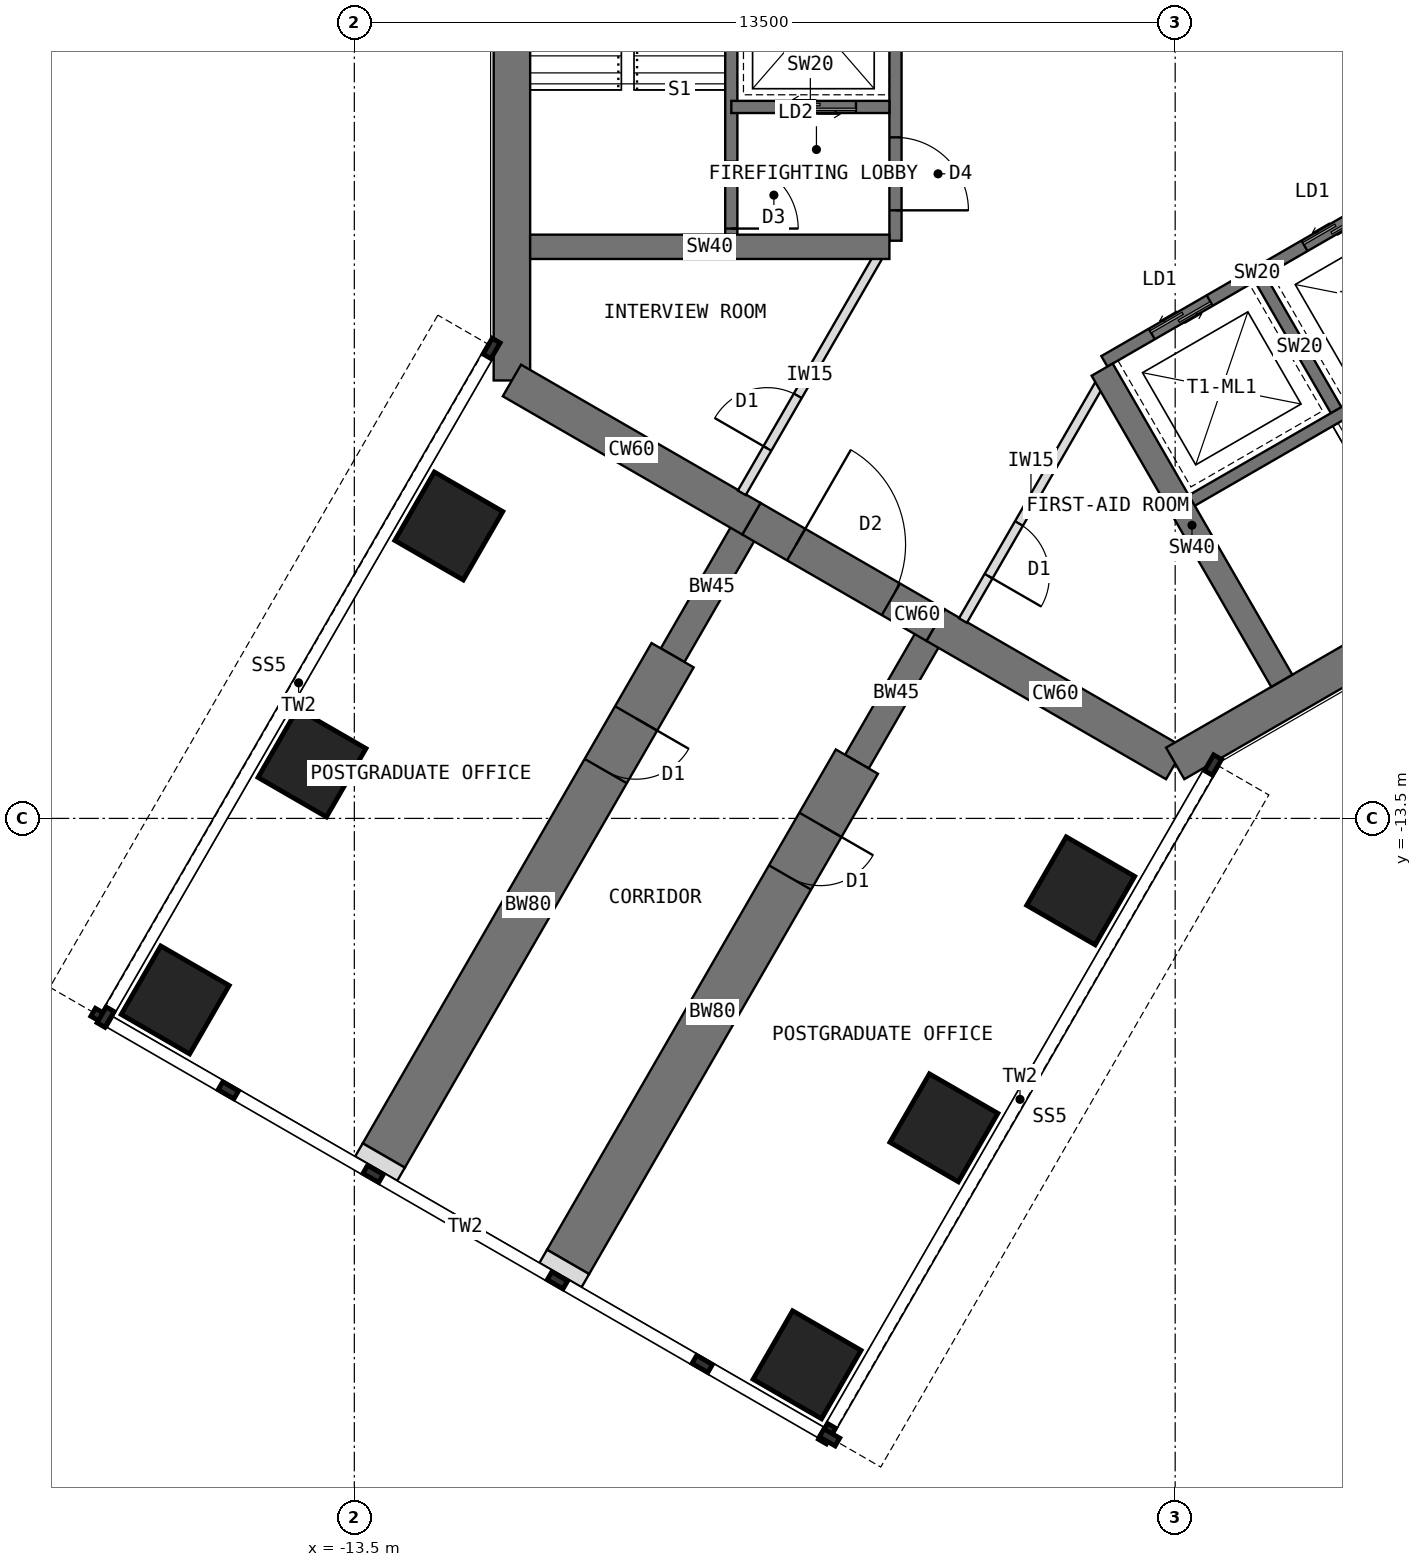
"""IFC4 building model, lengths in metres.
Left out: names, types, materials, properties, quantities, classifications, styles, units other than length and angle.
Written with IfcOpenShell. Run it as: python <this file> out.ifc"""

import sys

from ifc_helpers import new_model, si_unit, direction, frame, frame_2d, origin, origin_2d, place, context, subcontext, project, spatial, rectangle, extrude, element, fill, save


model = new_model("IFC4")
c1 = context("Model", 3, precision=1e-05, world=origin(), true_north=direction((0.0, 1.0)))
c2 = subcontext(c1, "Body", "Model", "MODEL_VIEW")
j1 = project(units=[si_unit("LENGTHUNIT", "METRE"), si_unit("PLANEANGLEUNIT", "RADIAN")], contexts=[c1])
p1 = place(None, origin())
s1 = spatial("IfcSite", under=j1, at=p1, CompositionType="ELEMENT")
p2 = place(p1, origin())
s2 = spatial("IfcBuilding", under=s1, at=p2, CompositionType="ELEMENT")
p3 = place(p2, frame((0.0, 0.0, 133.5)))
s3 = spatial("IfcBuildingStorey", under=s2, at=p3, CompositionType="ELEMENT", Elevation=133.5)
p4 = place(p3, frame((-10.908, 6.298, 0.0), z_axis=(0.0, 0.0, 1.0), x_axis=(0.0, -1.0, 0.0)))
e1 = element("IfcWall", 1, at=p4, inside=s3, PredefinedType="SHEAR", context=c2, shape_type="SweptSolid", body=[
    extrude(rectangle(XDim=12.596, YDim=0.6, at=frame_2d((6.298, 0.0))), origin(), (0.0, 0.0, 1.0), 4.0),
])
p5 = place(p3, frame((-10.908, -6.298, 0.0), z_axis=(0.0, 0.0, 1.0), x_axis=(0.866034513004, -0.499984222037, 0.0)))
e2 = element("IfcWall", 2, at=p5, inside=s3, PredefinedType="SHEAR", context=c2, shape_type="SweptSolid", body=[
    extrude(rectangle(XDim=4.548, YDim=0.6, at=frame_2d((2.274, 0.0))), origin(), (0.0, 0.0, 1.0), 4.0),
])
p6 = place(p3, frame((-6.97, -8.572, 0.0), z_axis=(0.0, 0.0, 1.0), x_axis=(0.866019471182, -0.500010275428, 0.0)))
e3 = element("IfcWall", 3, at=p6, inside=s3, PredefinedType="SHEAR", context=c2, shape_type="SweptSolid", body=[
    extrude(rectangle(XDim=3.5, YDim=0.6, at=frame_2d((1.75, 0.0))), origin(), (0.0, 0.0, 1.0), 4.0),
])
p7 = place(p6, frame((0.85, 0.0, 0.0)))
e4 = element("IfcOpeningElement", 4, at=p7, cuts=e3, PredefinedType="OPENING", context=c2, shape_type="SweptSolid", body=[
    extrude(rectangle(XDim=1.8, YDim=2.1, at=frame_2d((0.9, 1.05))), frame((0.0, 0.31, 0.0), z_axis=(0.0, -1.0, 0.0), x_axis=(1.0, 0.0, 0.0)), (0.0, 0.0, 1.0), 0.62),
])
p8 = place(p3, frame((-3.939, -10.322, 0.0), z_axis=(0.0, 0.0, 1.0), x_axis=(0.866011268655, -0.500024481964, 0.0)))
e5 = element("IfcWall", 5, at=p8, inside=s3, PredefinedType="SHEAR", context=c2, shape_type="SweptSolid", body=[
    extrude(rectangle(XDim=4.548, YDim=0.6, at=frame_2d((2.274, 0.0))), origin(), (0.0, 0.0, 1.0), 4.0),
])
p9 = place(p3, frame((0.0, -12.596, 0.0), z_axis=(0.0, 0.0, 1.0), x_axis=(0.866021940709, 0.500005998175, 0.0)))
e6 = element("IfcWall", 6, at=p9, inside=s3, PredefinedType="SHEAR", context=c2, shape_type="SweptSolid", body=[
    extrude(rectangle(XDim=12.596, YDim=0.6, at=frame_2d((6.298, 0.0))), origin(), (0.0, 0.0, 1.0), 4.0),
])
p10 = place(p3, frame((-3.939, -10.322, 0.0), z_axis=(0.0, 0.0, 1.0), x_axis=(-0.499918158782, -0.866072649678, 0.0)))
e7 = element("IfcWall", 7, at=p10, inside=s3, PredefinedType="SHEAR", context=c2, shape_type="SweptSolid", body=[
    extrude(rectangle(XDim=2.592, YDim=0.45, at=frame_2d((1.296, 0.0))), origin(), (0.0, 0.0, 1.0), 4.0),
])
p11 = place(p3, frame((-5.234, -12.566, 0.0), z_axis=(0.0, 0.0, 1.0), x_axis=(-0.499997557548, -0.86602681393, 0.0)))
e8 = element("IfcWall", 8, at=p11, inside=s3, PredefinedType="SHEAR", context=c2, shape_type="SweptSolid", body=[
    extrude(rectangle(XDim=9.5, YDim=0.8, at=frame_2d((4.75, 0.0))), origin(), (0.0, 0.0, 1.0), 4.0),
])
p12 = place(p11, frame((1.2, 0.0, 0.0)))
e9 = element("IfcOpeningElement", 9, at=p12, cuts=e8, PredefinedType="OPENING", context=c2, shape_type="SweptSolid", body=[
    extrude(rectangle(XDim=1.0, YDim=2.1, at=frame_2d((0.5, 1.05))), frame((0.0, 0.41, 0.0), z_axis=(0.0, -1.0, 0.0), x_axis=(1.0, 0.0, 0.0)), (0.0, 0.0, 1.0), 0.82),
])
p13 = place(p3, frame((-6.97, -8.572, 0.0), z_axis=(0.0, 0.0, 1.0), x_axis=(-0.499988811324, -0.866031863473, 0.0)))
e10 = element("IfcWall", 10, at=p13, inside=s3, PredefinedType="SHEAR", context=c2, shape_type="SweptSolid", body=[
    extrude(rectangle(XDim=2.592, YDim=0.45, at=frame_2d((1.296, 0.0))), origin(), (0.0, 0.0, 1.0), 4.0),
])
p14 = place(p3, frame((-8.266, -10.816, 0.0), z_axis=(0.0, 0.0, 1.0), x_axis=(-0.499997557548, -0.86602681393, 0.0)))
e11 = element("IfcWall", 11, at=p14, inside=s3, PredefinedType="SHEAR", context=c2, shape_type="SweptSolid", body=[
    extrude(rectangle(XDim=9.5, YDim=0.8, at=frame_2d((4.75, 0.0))), origin(), (0.0, 0.0, 1.0), 4.0),
])
p15 = place(p14, frame((1.2, 0.0, 0.0)))
e12 = element("IfcOpeningElement", 12, at=p15, cuts=e11, PredefinedType="OPENING", context=c2, shape_type="SweptSolid", body=[
    extrude(rectangle(XDim=1.0, YDim=2.1, at=frame_2d((0.5, 1.05))), frame((0.0, 0.41, 0.0), z_axis=(0.0, -1.0, 0.0), x_axis=(1.0, 0.0, 0.0)), (0.0, 0.0, 1.0), 0.82),
])
for number, where, z_axis, x_axis in (
    (13, (-1.554, -14.691, 0.0), (0.0, 0.0, 1.0), (0.5, 0.866, 0.0)),
    (14, (-11.946, -8.691, 0.0), (0.0, 0.0, 1.0), (0.5, 0.866, 0.0)),
    (15, (-3.804, -18.588, 0.0), (0.0, 0.0, 1.0), (0.5, 0.866, 0.0)),
    (16, (-14.196, -12.588, 0.0), (0.0, 0.0, 1.0), (0.5, 0.866, 0.0)),
    (17, (-6.054, -22.486, 0.0), (0.0, 0.0, 1.0), (0.5, 0.866, 0.0)),
    (18, (-16.446, -16.486, 0.0), (0.0, 0.0, 1.0), (0.5, 0.866, 0.0)),
):
    element("IfcColumn", number, at=place(p3, frame(where, z_axis=z_axis, x_axis=x_axis)), inside=s3, PredefinedType="COLUMN", context=c2, shape_type="SweptSolid", body=[
        extrude(rectangle(XDim=1.3, YDim=1.3, at=origin_2d()), origin(), (0.0, 0.0, 1.0), 4.0),
    ])
for number, where, z_axis, x_axis in (
    (19, (-9.984, -20.794, 0.0), (0.0, 0.0, 1.0), (-0.5, -0.866, 0.0)),
    (20, (-13.016, -19.044, 0.0), (0.0, 0.0, 1.0), (-0.5, -0.866, 0.0)),
):
    element("IfcWall", number, at=place(p3, frame(where, z_axis=z_axis, x_axis=x_axis)), inside=s3, PredefinedType="PARTITIONING", context=c2, shape_type="SweptSolid", body=[
        extrude(rectangle(XDim=0.25, YDim=0.8, at=frame_2d((0.125, 0.0))), origin(), (0.0, 0.0, 1.0), 3.8),
    ])
p16 = place(p3, frame((-4.6, 4.0, 0.0), z_axis=(0.0, 0.0, 1.0), x_axis=(0.0, -1.0, 0.0)))
e21 = element("IfcWall", 21, at=p16, inside=s3, PredefinedType="SHEAR", context=c2, shape_type="SweptSolid", body=[
    extrude(rectangle(XDim=8.0, YDim=0.2, at=frame_2d((4.0, 0.0))), origin(), (0.0, 0.0, 1.0), 4.0),
])
p17 = place(p16, frame((6.3, 0.0, 0.0)))
e22 = element("IfcOpeningElement", 22, at=p17, cuts=e21, PredefinedType="OPENING", context=c2, shape_type="SweptSolid", body=[
    extrude(rectangle(XDim=1.2, YDim=2.1, at=frame_2d((0.6, 1.05))), frame((0.0, 0.11, 0.0), z_axis=(0.0, -1.0, 0.0), x_axis=(1.0, 0.0, 0.0)), (0.0, 0.0, 1.0), 0.22),
])
p18 = place(p16, frame((0.9, 0.0, 0.0)))
e23 = element("IfcOpeningElement", 23, at=p18, cuts=e21, PredefinedType="OPENING", context=c2, shape_type="SweptSolid", body=[
    extrude(rectangle(XDim=1.1, YDim=2.2, at=frame_2d((0.55, 1.1))), frame((0.0, 0.11, 0.0), z_axis=(0.0, -1.0, 0.0), x_axis=(1.0, 0.0, 0.0)), (0.0, 0.0, 1.0), 0.22),
])
p19 = place(p3, frame((-4.7, -1.8, 0.0), z_axis=(0.0, 0.0, 1.0), x_axis=(-1.0, 0.0, 0.0)))
e24 = element("IfcWall", 24, at=p19, inside=s3, PredefinedType="SHEAR", context=c2, shape_type="SweptSolid", body=[
    extrude(rectangle(XDim=2.6, YDim=0.2, at=frame_2d((1.3, 0.0))), origin(), (0.0, 0.0, 1.0), 4.0),
])
p20 = place(p19, frame((0.55, 0.0, 0.0)))
e25 = element("IfcOpeningElement", 25, at=p20, cuts=e24, PredefinedType="OPENING", context=c2, shape_type="SweptSolid", body=[
    extrude(rectangle(XDim=1.3, YDim=2.2, at=frame_2d((0.65, 1.1))), frame((0.0, 0.11, 0.0), z_axis=(0.0, -1.0, 0.0), x_axis=(1.0, 0.0, 0.0)), (0.0, 0.0, 1.0), 0.22),
])
p21 = place(p3, frame((-7.3, 4.0, 0.0), z_axis=(0.0, 0.0, 1.0), x_axis=(0.0, -1.0, 0.0)))
e26 = element("IfcWall", 26, at=p21, inside=s3, PredefinedType="SHEAR", context=c2, shape_type="SweptSolid", body=[
    extrude(rectangle(XDim=8.0, YDim=0.2, at=frame_2d((4.0, 0.0))), origin(), (0.0, 0.0, 1.0), 4.0),
])
p22 = place(p21, frame((6.7, 0.0, 0.0)))
e27 = element("IfcOpeningElement", 27, at=p22, cuts=e26, PredefinedType="OPENING", context=c2, shape_type="SweptSolid", body=[
    extrude(rectangle(XDim=1.1, YDim=2.1, at=frame_2d((0.55, 1.05))), frame((0.0, 0.11, 0.0), z_axis=(0.0, -1.0, 0.0), x_axis=(1.0, 0.0, 0.0)), (0.0, 0.0, 1.0), 0.22),
])
p23 = place(p3, frame((-4.7, -4.1, 0.0), z_axis=(0.0, 0.0, 1.0), x_axis=(-1.0, 0.0, 0.0)))
e28 = element("IfcWall", 28, at=p23, inside=s3, PredefinedType="SHEAR", context=c2, shape_type="SweptSolid", body=[
    extrude(rectangle(XDim=5.908, YDim=0.4, at=frame_2d((2.954, 0.0))), origin(), (0.0, 0.0, 1.0), 4.0),
])
p24 = place(p3, frame((-1.164, -5.984, 0.0), z_axis=(0.0, 0.0, 1.0), x_axis=(0.866026010844, 0.49999894854, 0.0)))
e29 = element("IfcWall", 29, at=p24, inside=s3, PredefinedType="SHEAR", context=c2, shape_type="SweptSolid", body=[
    extrude(rectangle(XDim=8.0, YDim=0.2, at=frame_2d((4.0, 0.0))), origin(), (0.0, 0.0, 1.0), 4.0),
])
p25 = place(p24, frame((6.3, 0.0, 0.0)))
e30 = element("IfcOpeningElement", 30, at=p25, cuts=e29, PredefinedType="OPENING", context=c2, shape_type="SweptSolid", body=[
    extrude(rectangle(XDim=1.2, YDim=2.1, at=frame_2d((0.6, 1.05))), frame((0.0, 0.11, 0.0), z_axis=(0.0, -1.0, 0.0), x_axis=(1.0, 0.0, 0.0)), (0.0, 0.0, 1.0), 0.22),
])
p26 = place(p24, frame((0.9, 0.0, 0.0)))
e31 = element("IfcOpeningElement", 31, at=p26, cuts=e29, PredefinedType="OPENING", context=c2, shape_type="SweptSolid", body=[
    extrude(rectangle(XDim=1.1, YDim=2.2, at=frame_2d((0.55, 1.1))), frame((0.0, 0.11, 0.0), z_axis=(0.0, -1.0, 0.0), x_axis=(1.0, 0.0, 0.0)), (0.0, 0.0, 1.0), 0.22),
])
p27 = place(p24, frame((3.8, 0.0, 0.0)))
e32 = element("IfcOpeningElement", 32, at=p27, cuts=e29, PredefinedType="OPENING", context=c2, shape_type="SweptSolid", body=[
    extrude(rectangle(XDim=1.1, YDim=2.2, at=frame_2d((0.55, 1.1))), frame((0.0, 0.11, 0.0), z_axis=(0.0, -1.0, 0.0), x_axis=(1.0, 0.0, 0.0)), (0.0, 0.0, 1.0), 0.22),
])
p28 = place(p3, frame((1.397, -4.62, 0.0), z_axis=(0.0, 0.0, 1.0), x_axis=(0.499936506574, -0.866062058628, 0.0)))
e33 = element("IfcWall", 33, at=p28, inside=s3, PredefinedType="SHEAR", context=c2, shape_type="SweptSolid", body=[
    extrude(rectangle(XDim=2.6, YDim=0.2, at=frame_2d((1.3, 0.0))), origin(), (0.0, 0.0, 1.0), 4.0),
])
p29 = place(p3, frame((0.186, -8.322, 0.0), z_axis=(0.0, 0.0, 1.0), x_axis=(0.866026010844, 0.49999894854, 0.0)))
e34 = element("IfcWall", 34, at=p29, inside=s3, PredefinedType="SHEAR", context=c2, shape_type="SweptSolid", body=[
    extrude(rectangle(XDim=8.0, YDim=0.2, at=frame_2d((4.0, 0.0))), origin(), (0.0, 0.0, 1.0), 4.0),
])
p30 = place(p29, frame((6.7, 0.0, 0.0)))
e35 = element("IfcOpeningElement", 35, at=p30, cuts=e34, PredefinedType="OPENING", context=c2, shape_type="SweptSolid", body=[
    extrude(rectangle(XDim=1.1, YDim=2.1, at=frame_2d((0.55, 1.05))), frame((0.0, 0.11, 0.0), z_axis=(0.0, -1.0, 0.0), x_axis=(1.0, 0.0, 0.0)), (0.0, 0.0, 1.0), 0.22),
])
p31 = place(p3, frame((-1.201, -6.12, 0.0), z_axis=(0.0, 0.0, 1.0), x_axis=(0.49999668571, -0.866027317282, 0.0)))
e36 = element("IfcWall", 36, at=p31, inside=s3, PredefinedType="SHEAR", context=c2, shape_type="SweptSolid", body=[
    extrude(rectangle(XDim=5.908, YDim=0.4, at=frame_2d((2.954, 0.0))), origin(), (0.0, 0.0, 1.0), 4.0),
])
p32 = place(p3, frame((-1.253, -6.37, 0.0), z_axis=(0.0, 0.0, 1.0), x_axis=(-0.499999473313, -0.866025707867, 0.0)))
e37 = element("IfcWall", 37, at=p32, inside=s3, PredefinedType="PARTITIONING", context=c2, shape_type="SweptSolid", body=[
    extrude(rectangle(XDim=4.476, YDim=0.15, at=frame_2d((2.238, 0.0))), origin(), (0.0, 0.0, 1.0), 3.8),
])
p33 = place(p32, frame((2.633, 0.0, 0.0)))
e38 = element("IfcOpeningElement", 38, at=p33, cuts=e37, PredefinedType="OPENING", context=c2, shape_type="SweptSolid", body=[
    extrude(rectangle(XDim=1.0, YDim=2.1, at=frame_2d((0.5, 1.05))), frame((0.0, 0.085, 0.0), z_axis=(0.0, -1.0, 0.0), x_axis=(1.0, 0.0, 0.0)), (0.0, 0.0, 1.0), 0.17),
])
p34 = place(p3, frame((-7.128, -8.146, 0.0), z_axis=(0.0, 0.0, 1.0), x_axis=(0.499999473313, 0.866025707867, 0.0)))
e39 = element("IfcWall", 39, at=p34, inside=s3, PredefinedType="PARTITIONING", context=c2, shape_type="SweptSolid", body=[
    extrude(rectangle(XDim=4.476, YDim=0.15, at=frame_2d((2.238, 0.0))), origin(), (0.0, 0.0, 1.0), 3.8),
])
p35 = place(p34, frame((0.843, 0.0, 0.0)))
e40 = element("IfcOpeningElement", 40, at=p35, cuts=e39, PredefinedType="OPENING", context=c2, shape_type="SweptSolid", body=[
    extrude(rectangle(XDim=1.0, YDim=2.1, at=frame_2d((0.5, 1.05))), frame((0.0, 0.085, 0.0), z_axis=(0.0, -1.0, 0.0), x_axis=(1.0, 0.0, 0.0)), (0.0, 0.0, 1.0), 0.17),
])
p36 = place(p17, origin())
e41 = element("IfcDoor", 41, at=p36, inside=s3, OperationType="SINGLE_SWING_RIGHT", PredefinedType="DOOR", context=c2, shape_type="SweptSolid", body=[
    extrude(rectangle(XDim=1.2, YDim=2.1, at=frame_2d((0.6, 1.05))), frame((0.0, 0.025, 0.0), z_axis=(0.0, -1.0, 0.0), x_axis=(1.0, 0.0, 0.0)), (0.0, 0.0, 1.0), 0.05),
])
fill(e22, e41)
p37 = place(p20, origin())
e42 = element("IfcDoor", 42, at=p37, inside=s3, OperationType="DOUBLE_DOOR_SLIDING", PredefinedType="DOOR", context=c2, shape_type="SweptSolid", body=[
    extrude(rectangle(XDim=1.3, YDim=2.2, at=frame_2d((0.65, 1.1))), frame((0.0, 0.025, 0.0), z_axis=(0.0, -1.0, 0.0), x_axis=(1.0, 0.0, 0.0)), (0.0, 0.0, 1.0), 0.05),
])
fill(e25, e42)
p38 = place(p22, origin())
e43 = element("IfcDoor", 43, at=p38, inside=s3, OperationType="SINGLE_SWING_RIGHT", PredefinedType="DOOR", context=c2, shape_type="SweptSolid", body=[
    extrude(rectangle(XDim=1.1, YDim=2.1, at=frame_2d((0.55, 1.05))), frame((0.0, 0.025, 0.0), z_axis=(0.0, -1.0, 0.0), x_axis=(1.0, 0.0, 0.0)), (0.0, 0.0, 1.0), 0.05),
])
fill(e27, e43)
p39 = place(p26, origin())
e44 = element("IfcDoor", 44, at=p39, inside=s3, OperationType="DOUBLE_DOOR_SLIDING", PredefinedType="DOOR", context=c2, shape_type="SweptSolid", body=[
    extrude(rectangle(XDim=1.1, YDim=2.2, at=frame_2d((0.55, 1.1))), frame((0.0, 0.025, 0.0), z_axis=(0.0, -1.0, 0.0), x_axis=(1.0, 0.0, 0.0)), (0.0, 0.0, 1.0), 0.05),
])
fill(e31, e44)
p40 = place(p27, origin())
e45 = element("IfcDoor", 45, at=p40, inside=s3, OperationType="DOUBLE_DOOR_SLIDING", PredefinedType="DOOR", context=c2, shape_type="SweptSolid", body=[
    extrude(rectangle(XDim=1.1, YDim=2.2, at=frame_2d((0.55, 1.1))), frame((0.0, 0.025, 0.0), z_axis=(0.0, -1.0, 0.0), x_axis=(1.0, 0.0, 0.0)), (0.0, 0.0, 1.0), 0.05),
])
fill(e32, e45)
p41 = place(p7, origin())
e46 = element("IfcDoor", 46, at=p41, inside=s3, OperationType="DOUBLE_DOOR_DOUBLE_SWING", PredefinedType="DOOR", context=c2, shape_type="SweptSolid", body=[
    extrude(rectangle(XDim=1.72, YDim=2.06, at=frame_2d((0.9, 1.03))), frame((0.0, 0.025, 0.0), z_axis=(0.0, -1.0, 0.0), x_axis=(1.0, 0.0, 0.0)), (0.0, 0.0, 1.0), 0.05),
    extrude(rectangle(XDim=0.04, YDim=2.1, at=frame_2d((0.02, 1.05))), frame((0.0, 0.3, 0.0), z_axis=(0.0, -1.0, 0.0), x_axis=(1.0, 0.0, 0.0)), (0.0, 0.0, 1.0), 0.6),
    extrude(rectangle(XDim=0.04, YDim=2.1, at=frame_2d((1.78, 1.05))), frame((0.0, 0.3, 0.0), z_axis=(0.0, -1.0, 0.0), x_axis=(1.0, 0.0, 0.0)), (0.0, 0.0, 1.0), 0.6),
    extrude(rectangle(XDim=1.72, YDim=0.04, at=frame_2d((0.9, 2.08))), frame((0.0, 0.3, 0.0), z_axis=(0.0, -1.0, 0.0), x_axis=(1.0, 0.0, 0.0)), (0.0, 0.0, 1.0), 0.6),
])
fill(e4, e46)
p42 = place(p35, origin())
e47 = element("IfcDoor", 47, at=p42, inside=s3, OperationType="SINGLE_SWING_LEFT", PredefinedType="DOOR", context=c2, shape_type="SweptSolid", body=[
    extrude(rectangle(XDim=1.0, YDim=2.1, at=frame_2d((0.5, 1.05))), frame((0.0, 0.025, 0.0), z_axis=(0.0, -1.0, 0.0), x_axis=(1.0, 0.0, 0.0)), (0.0, 0.0, 1.0), 0.05),
])
fill(e40, e47)
p43 = place(p33, origin())
e48 = element("IfcDoor", 48, at=p43, inside=s3, OperationType="SINGLE_SWING_RIGHT", PredefinedType="DOOR", context=c2, shape_type="SweptSolid", body=[
    extrude(rectangle(XDim=1.0, YDim=2.1, at=frame_2d((0.5, 1.05))), frame((0.0, 0.025, 0.0), z_axis=(0.0, -1.0, 0.0), x_axis=(1.0, 0.0, 0.0)), (0.0, 0.0, 1.0), 0.05),
])
fill(e38, e48)
p44 = place(p12, origin())
e49 = element("IfcDoor", 49, at=p44, inside=s3, OperationType="SINGLE_SWING_LEFT", PredefinedType="DOOR", context=c2, shape_type="SweptSolid", body=[
    extrude(rectangle(XDim=0.92, YDim=2.06, at=frame_2d((0.5, 1.03))), frame((0.0, 0.025, 0.0), z_axis=(0.0, -1.0, 0.0), x_axis=(1.0, 0.0, 0.0)), (0.0, 0.0, 1.0), 0.05),
    extrude(rectangle(XDim=0.04, YDim=2.1, at=frame_2d((0.02, 1.05))), frame((0.0, 0.4, 0.0), z_axis=(0.0, -1.0, 0.0), x_axis=(1.0, 0.0, 0.0)), (0.0, 0.0, 1.0), 0.8),
    extrude(rectangle(XDim=0.04, YDim=2.1, at=frame_2d((0.98, 1.05))), frame((0.0, 0.4, 0.0), z_axis=(0.0, -1.0, 0.0), x_axis=(1.0, 0.0, 0.0)), (0.0, 0.0, 1.0), 0.8),
    extrude(rectangle(XDim=0.92, YDim=0.04, at=frame_2d((0.5, 2.08))), frame((0.0, 0.4, 0.0), z_axis=(0.0, -1.0, 0.0), x_axis=(1.0, 0.0, 0.0)), (0.0, 0.0, 1.0), 0.8),
])
fill(e9, e49)
p45 = place(p15, origin())
e50 = element("IfcDoor", 50, at=p45, inside=s3, OperationType="SINGLE_SWING_LEFT", PredefinedType="DOOR", context=c2, shape_type="SweptSolid", body=[
    extrude(rectangle(XDim=0.92, YDim=2.06, at=frame_2d((0.5, 1.03))), frame((0.0, 0.025, 0.0), z_axis=(0.0, -1.0, 0.0), x_axis=(1.0, 0.0, 0.0)), (0.0, 0.0, 1.0), 0.05),
    extrude(rectangle(XDim=0.04, YDim=2.1, at=frame_2d((0.02, 1.05))), frame((0.0, 0.4, 0.0), z_axis=(0.0, -1.0, 0.0), x_axis=(1.0, 0.0, 0.0)), (0.0, 0.0, 1.0), 0.8),
    extrude(rectangle(XDim=0.04, YDim=2.1, at=frame_2d((0.98, 1.05))), frame((0.0, 0.4, 0.0), z_axis=(0.0, -1.0, 0.0), x_axis=(1.0, 0.0, 0.0)), (0.0, 0.0, 1.0), 0.8),
    extrude(rectangle(XDim=0.92, YDim=0.04, at=frame_2d((0.5, 2.08))), frame((0.0, 0.4, 0.0), z_axis=(0.0, -1.0, 0.0), x_axis=(1.0, 0.0, 0.0)), (0.0, 0.0, 1.0), 0.8),
])
fill(e12, e50)
save(model, sys.argv[1])
